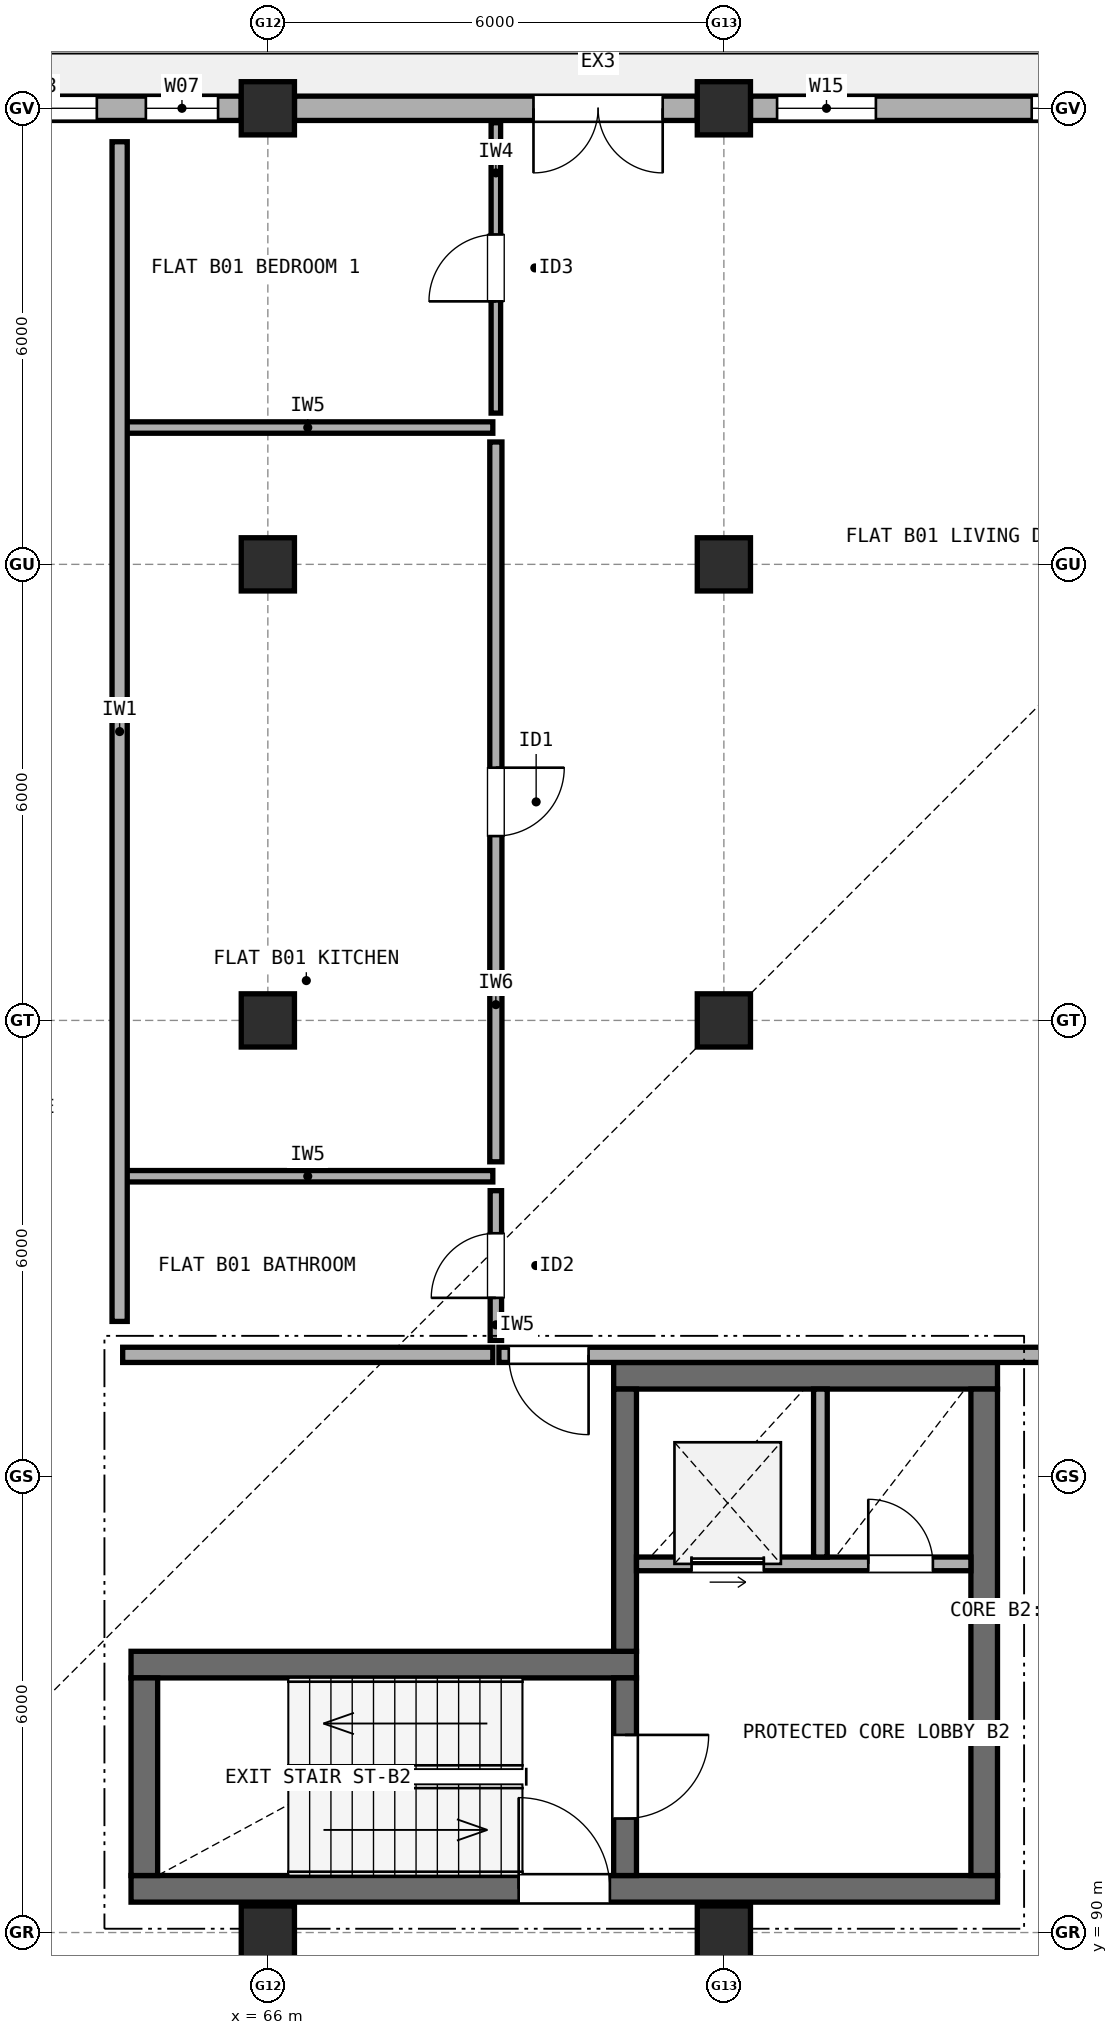
"""IFC4 building model, lengths in metres.
Left out: names, types, materials, properties, quantities, classifications, styles, units other than length and angle.
Written with IfcOpenShell. Run it as: python <this file> out.ifc"""

import sys

from ifc_helpers import new_model, si_unit, direction, frame, frame_2d, origin, origin_2d, place, context, subcontext, project, spatial, rectangle, extrude, element, fill, save


model = new_model("IFC4")
c1 = context("Model", 3, precision=1e-05, world=origin(), true_north=direction((0.0, 1.0)))
c2 = subcontext(c1, "Body", "Model", "MODEL_VIEW")
j1 = project(units=[si_unit("LENGTHUNIT", "METRE"), si_unit("PLANEANGLEUNIT", "RADIAN")], contexts=[c1])
p1 = place(None, origin())
s1 = spatial("IfcSite", under=j1, at=p1, CompositionType="ELEMENT")
p2 = place(p1, origin())
s2 = spatial("IfcBuilding", under=s1, at=p2, CompositionType="ELEMENT")
p3 = place(p2, origin())
s3 = spatial("IfcBuildingStorey", under=s2, at=p3, CompositionType="ELEMENT", Elevation=0.0)
for number, where, z_axis, x_axis in (
    (1, (66.0, 90.0, 0.0), (0.0, 0.0, 1.0), (1.0, 0.0, 0.0)),
    (2, (66.0, 102.0, 0.0), (0.0, 0.0, 1.0), (1.0, 0.0, 0.0)),
    (3, (66.0, 108.0, 0.0), (0.0, 0.0, 1.0), (1.0, 0.0, 0.0)),
    (4, (66.0, 114.0, 0.0), (0.0, 0.0, 1.0), (1.0, 0.0, 0.0)),
    (5, (72.0, 90.0, 0.0), (0.0, 0.0, 1.0), (1.0, 0.0, 0.0)),
    (6, (72.0, 102.0, 0.0), (0.0, 0.0, 1.0), (1.0, 0.0, 0.0)),
    (7, (72.0, 108.0, 0.0), (0.0, 0.0, 1.0), (1.0, 0.0, 0.0)),
    (8, (72.0, 114.0, 0.0), (0.0, 0.0, 1.0), (1.0, 0.0, 0.0)),
):
    element("IfcColumn", number, at=place(p3, frame(where, z_axis=z_axis, x_axis=x_axis)), inside=s3, PredefinedType="COLUMN", context=c2, shape_type="SweptSolid", body=[
        extrude(rectangle(XDim=0.7, YDim=0.7, at=origin_2d()), origin(), (0.0, 0.0, 1.0), 4.23),
    ])
p4 = place(p3, frame((77.7, 114.0, 0.0), z_axis=(0.0, 0.0, 1.0), x_axis=(-1.0, 0.0, 0.0)))
e9 = element("IfcWall", 9, at=p4, inside=s3, PredefinedType="STANDARD", context=c2, shape_type="SweptSolid", body=[
    extrude(rectangle(XDim=5.35, YDim=0.32, at=frame_2d((2.675, 0.0))), origin(), (0.0, 0.0, 1.0), 3.562),
])
p5 = place(p4, frame((0.35, 0.0, 0.9)))
e10 = element("IfcOpeningElement", 10, at=p5, cuts=e9, PredefinedType="OPENING", context=c2, shape_type="SweptSolid", body=[
    extrude(rectangle(XDim=1.3, YDim=1.45, at=frame_2d((0.65, 0.725))), frame((0.0, 0.17, 0.0), z_axis=(0.0, -1.0, 0.0), x_axis=(1.0, 0.0, 0.0)), (0.0, 0.0, 1.0), 0.34),
])
p6 = place(p4, frame((3.7, 0.0, 0.9)))
e11 = element("IfcOpeningElement", 11, at=p6, cuts=e9, PredefinedType="OPENING", context=c2, shape_type="SweptSolid", body=[
    extrude(rectangle(XDim=1.3, YDim=1.45, at=frame_2d((0.65, 0.725))), frame((0.0, 0.17, 0.0), z_axis=(0.0, -1.0, 0.0), x_axis=(1.0, 0.0, 0.0)), (0.0, 0.0, 1.0), 0.34),
])
p7 = place(p3, frame((71.65, 114.0, 0.0), z_axis=(0.0, 0.0, 1.0), x_axis=(-1.0, 0.0, 0.0)))
e12 = element("IfcWall", 12, at=p7, inside=s3, PredefinedType="STANDARD", context=c2, shape_type="SweptSolid", body=[
    extrude(rectangle(XDim=5.3, YDim=0.32, at=frame_2d((2.65, 0.0))), origin(), (0.0, 0.0, 1.0), 3.562),
])
p8 = place(p7, frame((0.455, 0.0, 0.0)))
e13 = element("IfcOpeningElement", 13, at=p8, cuts=e12, PredefinedType="OPENING", context=c2, shape_type="SweptSolid", body=[
    extrude(rectangle(XDim=1.7, YDim=2.2, at=frame_2d((0.85, 1.1))), frame((0.0, 0.17, 0.0), z_axis=(0.0, -1.0, 0.0), x_axis=(1.0, 0.0, 0.0)), (0.0, 0.0, 1.0), 0.34),
])
p9 = place(p3, frame((65.65, 114.0, 0.0), z_axis=(0.0, 0.0, 1.0), x_axis=(-1.0, 0.0, 0.0)))
e14 = element("IfcWall", 14, at=p9, inside=s3, PredefinedType="STANDARD", context=c2, shape_type="SweptSolid", body=[
    extrude(rectangle(XDim=5.3, YDim=0.32, at=frame_2d((2.65, 0.0))), origin(), (0.0, 0.0, 1.0), 3.562),
])
p10 = place(p9, frame((0.305, 0.0, 0.9)))
e15 = element("IfcOpeningElement", 15, at=p10, cuts=e14, PredefinedType="OPENING", context=c2, shape_type="SweptSolid", body=[
    extrude(rectangle(XDim=0.95, YDim=1.35, at=frame_2d((0.475, 0.675))), frame((0.0, 0.17, 0.0), z_axis=(0.0, -1.0, 0.0), x_axis=(1.0, 0.0, 0.0)), (0.0, 0.0, 1.0), 0.34),
])
p11 = place(p9, frame((1.9, 0.0, 0.9)))
e16 = element("IfcOpeningElement", 16, at=p11, cuts=e14, PredefinedType="OPENING", context=c2, shape_type="SweptSolid", body=[
    extrude(rectangle(XDim=1.5, YDim=1.4, at=frame_2d((0.75, 0.7))), frame((0.0, 0.17, 0.0), z_axis=(0.0, -1.0, 0.0), x_axis=(1.0, 0.0, 0.0)), (0.0, 0.0, 1.0), 0.34),
])
p12 = place(p9, frame((3.995, 0.0, 0.9)))
e17 = element("IfcOpeningElement", 17, at=p12, cuts=e14, PredefinedType="OPENING", context=c2, shape_type="SweptSolid", body=[
    extrude(rectangle(XDim=1.05, YDim=1.35, at=frame_2d((0.525, 0.675))), frame((0.0, 0.17, 0.0), z_axis=(0.0, -1.0, 0.0), x_axis=(1.0, 0.0, 0.0)), (0.0, 0.0, 1.0), 0.34),
])
p13 = place(p3, frame((64.2, 90.575, 0.0), z_axis=(0.0, 0.0, 1.0), x_axis=(1.0, 0.0, 0.0)))
e18 = element("IfcWall", 18, at=p13, inside=s3, PredefinedType="SHEAR", context=c2, shape_type="SweptSolid", body=[
    extrude(rectangle(XDim=11.4, YDim=0.35, at=frame_2d((5.7, 0.0))), origin(), (0.0, 0.0, 1.0), 4.23),
])
p14 = place(p13, frame((5.1, 0.0, 0.0)))
e19 = element("IfcOpeningElement", 19, at=p14, cuts=e18, PredefinedType="OPENING", context=c2, shape_type="SweptSolid", body=[
    extrude(rectangle(XDim=1.2, YDim=2.15, at=frame_2d((0.6, 1.075))), frame((0.0, 0.185, 0.0), z_axis=(0.0, -1.0, 0.0), x_axis=(1.0, 0.0, 0.0)), (0.0, 0.0, 1.0), 0.37),
])
p15 = place(p3, frame((70.85, 93.525, 0.0), z_axis=(0.0, 0.0, 1.0), x_axis=(-1.0, 0.0, 0.0)))
e20 = element("IfcWall", 20, at=p15, inside=s3, PredefinedType="SHEAR", context=c2, shape_type="SweptSolid", body=[
    extrude(rectangle(XDim=6.65, YDim=0.35, at=frame_2d((3.325, 0.0))), origin(), (0.0, 0.0, 1.0), 4.23),
])
p16 = place(p3, frame((64.375, 93.35, 0.0), z_axis=(0.0, 0.0, 1.0), x_axis=(0.0, -1.0, 0.0)))
e21 = element("IfcWall", 21, at=p16, inside=s3, PredefinedType="SHEAR", context=c2, shape_type="SweptSolid", body=[
    extrude(rectangle(XDim=2.6, YDim=0.35, at=frame_2d((1.3, 0.0))), origin(), (0.0, 0.0, 1.0), 4.23),
])
p17 = place(p3, frame((70.7, 90.75, 0.0), z_axis=(0.0, 0.0, 1.0), x_axis=(0.0, 1.0, 0.0)))
e22 = element("IfcWall", 22, at=p17, inside=s3, PredefinedType="SHEAR", context=c2, shape_type="SweptSolid", body=[
    extrude(rectangle(XDim=2.6, YDim=0.3, at=frame_2d((1.3, 0.0))), origin(), (0.0, 0.0, 1.0), 4.23),
])
p18 = place(p17, frame((0.75, 0.0, 0.0)))
e23 = element("IfcOpeningElement", 23, at=p18, cuts=e22, PredefinedType="OPENING", context=c2, shape_type="SweptSolid", body=[
    extrude(rectangle(XDim=1.1, YDim=2.15, at=frame_2d((0.55, 1.075))), frame((0.0, 0.16, 0.0), z_axis=(0.0, -1.0, 0.0), x_axis=(1.0, 0.0, 0.0)), (0.0, 0.0, 1.0), 0.32),
])
p19 = place(p3, frame((75.6, 97.325, 0.0), z_axis=(0.0, 0.0, 1.0), x_axis=(-1.0, 0.0, 0.0)))
e24 = element("IfcWall", 24, at=p19, inside=s3, PredefinedType="SHEAR", context=c2, shape_type="SweptSolid", body=[
    extrude(rectangle(XDim=5.05, YDim=0.35, at=frame_2d((2.525, 0.0))), origin(), (0.0, 0.0, 1.0), 4.23),
])
p20 = place(p3, frame((75.425, 90.75, 0.0), z_axis=(0.0, 0.0, 1.0), x_axis=(0.0, 1.0, 0.0)))
e25 = element("IfcWall", 25, at=p20, inside=s3, PredefinedType="SHEAR", context=c2, shape_type="SweptSolid", body=[
    extrude(rectangle(XDim=6.4, YDim=0.35, at=frame_2d((3.2, 0.0))), origin(), (0.0, 0.0, 1.0), 4.23),
])
p21 = place(p3, frame((70.7, 93.7, 0.0), z_axis=(0.0, 0.0, 1.0), x_axis=(0.0, 1.0, 0.0)))
e26 = element("IfcWall", 26, at=p21, inside=s3, PredefinedType="SHEAR", context=c2, shape_type="SweptSolid", body=[
    extrude(rectangle(XDim=3.45, YDim=0.3, at=frame_2d((1.725, 0.0))), origin(), (0.0, 0.0, 1.0), 4.23),
])
p22 = place(p3, frame((70.85, 94.85, 0.0), z_axis=(0.0, 0.0, 1.0), x_axis=(1.0, 0.0, 0.0)))
e27 = element("IfcWall", 27, at=p22, inside=s3, PredefinedType="SOLIDWALL", context=c2, shape_type="SweptSolid", body=[
    extrude(rectangle(XDim=4.4, YDim=0.18, at=frame_2d((2.2, 0.0))), origin(), (0.0, 0.0, 1.0), 4.23),
])
p23 = place(p22, frame((0.725, 0.0, 0.0)))
e28 = element("IfcOpeningElement", 28, at=p23, cuts=e27, PredefinedType="OPENING", context=c2, shape_type="SweptSolid", body=[
    extrude(rectangle(XDim=0.95, YDim=2.15, at=frame_2d((0.475, 1.075))), frame((0.0, 0.1, 0.0), z_axis=(0.0, -1.0, 0.0), x_axis=(1.0, 0.0, 0.0)), (0.0, 0.0, 1.0), 0.2),
])
p24 = place(p22, frame((3.05, 0.0, 0.0)))
e29 = element("IfcOpeningElement", 29, at=p24, cuts=e27, PredefinedType="OPENING", context=c2, shape_type="SweptSolid", body=[
    extrude(rectangle(XDim=0.85, YDim=2.1, at=frame_2d((0.425, 1.05))), frame((0.0, 0.1, 0.0), z_axis=(0.0, -1.0, 0.0), x_axis=(1.0, 0.0, 0.0)), (0.0, 0.0, 1.0), 0.2),
])
p25 = place(p3, frame((73.27, 94.94, 0.0), z_axis=(0.0, 0.0, 1.0), x_axis=(0.0, 1.0, 0.0)))
e30 = element("IfcWall", 30, at=p25, inside=s3, PredefinedType="SOLIDWALL", context=c2, shape_type="SweptSolid", body=[
    extrude(rectangle(XDim=2.21, YDim=0.18, at=frame_2d((1.105, 0.0))), origin(), (0.0, 0.0, 1.0), 4.23),
])
p26 = place(p3, frame((64.09, 97.6, 0.0), z_axis=(0.0, 0.0, 1.0), x_axis=(1.0, 0.0, 0.0)))
e31 = element("IfcWall", 31, at=p26, inside=s3, PredefinedType="SOLIDWALL", context=c2, shape_type="SweptSolid", body=[
    extrude(rectangle(XDim=4.87, YDim=0.2, at=frame_2d((2.435, 0.0))), origin(), (0.0, 0.0, 1.0), 4.23),
])
p27 = place(p3, frame((69.04, 97.6, 0.0), z_axis=(0.0, 0.0, 1.0), x_axis=(1.0, 0.0, 0.0)))
e32 = element("IfcWall", 32, at=p27, inside=s3, PredefinedType="SOLIDWALL", context=c2, shape_type="SweptSolid", body=[
    extrude(rectangle(XDim=11.92, YDim=0.2, at=frame_2d((5.96, 0.0))), origin(), (0.0, 0.0, 1.0), 3.712),
])
p28 = place(p27, frame((0.13, 0.0, 0.0)))
e33 = element("IfcOpeningElement", 33, at=p28, cuts=e32, PredefinedType="OPENING", context=c2, shape_type="SweptSolid", body=[
    extrude(rectangle(XDim=1.05, YDim=2.15, at=frame_2d((0.525, 1.075))), frame((0.0, 0.11, 0.0), z_axis=(0.0, -1.0, 0.0), x_axis=(1.0, 0.0, 0.0)), (0.0, 0.0, 1.0), 0.22),
])
p29 = place(p3, frame((69.0, 109.99, 0.0), z_axis=(0.0, 0.0, 1.0), x_axis=(0.0, 1.0, 0.0)))
e34 = element("IfcWall", 34, at=p29, inside=s3, PredefinedType="PARTITIONING", context=c2, shape_type="SweptSolid", body=[
    extrude(rectangle(XDim=3.82, YDim=0.125, at=frame_2d((1.91, 0.0))), origin(), (0.0, 0.0, 1.0), 4.23),
])
p30 = place(p29, frame((1.47, 0.0, 0.0)))
e35 = element("IfcOpeningElement", 35, at=p30, cuts=e34, PredefinedType="OPENING", context=c2, shape_type="SweptSolid", body=[
    extrude(rectangle(XDim=0.88, YDim=2.1, at=frame_2d((0.44, 1.05))), frame((0.0, 0.073, 0.0), z_axis=(0.0, -1.0, 0.0), x_axis=(1.0, 0.0, 0.0)), (0.0, 0.0, 1.0), 0.145),
])
p31 = place(p3, frame((69.0, 100.14, 0.0), z_axis=(0.0, 0.0, 1.0), x_axis=(0.0, 1.0, 0.0)))
e36 = element("IfcWall", 36, at=p31, inside=s3, PredefinedType="PLUMBINGWALL", context=c2, shape_type="SweptSolid", body=[
    extrude(rectangle(XDim=9.47, YDim=0.16, at=frame_2d((4.735, 0.0))), origin(), (0.0, 0.0, 1.0), 3.112),
])
p32 = place(p31, frame((4.285, 0.0, 0.0)))
e37 = element("IfcOpeningElement", 37, at=p32, cuts=e36, PredefinedType="OPENING", context=c2, shape_type="SweptSolid", body=[
    extrude(rectangle(XDim=0.9, YDim=2.1, at=frame_2d((0.45, 1.05))), frame((0.0, 0.09, 0.0), z_axis=(0.0, -1.0, 0.0), x_axis=(1.0, 0.0, 0.0)), (0.0, 0.0, 1.0), 0.18),
])
p33 = place(p3, frame((69.0, 97.79, 0.0), z_axis=(0.0, 0.0, 1.0), x_axis=(0.0, 1.0, 0.0)))
e38 = element("IfcWall", 38, at=p33, inside=s3, PredefinedType="PARTITIONING", context=c2, shape_type="SweptSolid", body=[
    extrude(rectangle(XDim=1.97, YDim=0.15, at=frame_2d((0.985, 0.0))), origin(), (0.0, 0.0, 1.0), 4.23),
])
p34 = place(p33, frame((0.56, 0.0, 0.0)))
e39 = element("IfcOpeningElement", 39, at=p34, cuts=e38, PredefinedType="OPENING", context=c2, shape_type="SweptSolid", body=[
    extrude(rectangle(XDim=0.85, YDim=2.1, at=frame_2d((0.425, 1.05))), frame((0.0, 0.085, 0.0), z_axis=(0.0, -1.0, 0.0), x_axis=(1.0, 0.0, 0.0)), (0.0, 0.0, 1.0), 0.17),
])
p35 = place(p3, frame((64.09, 109.8, 0.0), z_axis=(0.0, 0.0, 1.0), x_axis=(1.0, 0.0, 0.0)))
e40 = element("IfcWall", 40, at=p35, inside=s3, PredefinedType="PARTITIONING", context=c2, shape_type="SweptSolid", body=[
    extrude(rectangle(XDim=4.87, YDim=0.15, at=frame_2d((2.435, 0.0))), origin(), (0.0, 0.0, 1.0), 3.612),
])
p36 = place(p3, frame((64.09, 99.95, 0.0), z_axis=(0.0, 0.0, 1.0), x_axis=(1.0, 0.0, 0.0)))
e41 = element("IfcWall", 41, at=p36, inside=s3, PredefinedType="PARTITIONING", context=c2, shape_type="SweptSolid", body=[
    extrude(rectangle(XDim=4.87, YDim=0.15, at=frame_2d((2.435, 0.0))), origin(), (0.0, 0.0, 1.0), 4.23),
])
p37 = place(p3, frame((64.05, 98.04, 0.0), z_axis=(0.0, 0.0, 1.0), x_axis=(0.0, 1.0, 0.0)))
e42 = element("IfcWall", 42, at=p37, inside=s3, PredefinedType="SOLIDWALL", context=c2, shape_type="SweptSolid", body=[
    extrude(rectangle(XDim=15.52, YDim=0.2, at=frame_2d((7.76, 0.0))), origin(), (0.0, 0.0, 1.0), 3.112),
])
p38 = place(p5, origin())
e43 = element("IfcWindow", 43, at=p38, inside=s3, PartitioningType="SINGLE_PANEL", PredefinedType="WINDOW", context=c2, shape_type="SweptSolid", body=[
    extrude(rectangle(XDim=1.3, YDim=1.45, at=frame_2d((0.65, 0.725))), frame((0.0, 0.03, 0.0), z_axis=(0.0, -1.0, 0.0), x_axis=(1.0, 0.0, 0.0)), (0.0, 0.0, 1.0), 0.06),
])
fill(e10, e43)
p39 = place(p6, origin())
e44 = element("IfcWindow", 44, at=p39, inside=s3, PartitioningType="SINGLE_PANEL", PredefinedType="WINDOW", context=c2, shape_type="SweptSolid", body=[
    extrude(rectangle(XDim=1.3, YDim=1.45, at=frame_2d((0.65, 0.725))), frame((0.0, 0.03, 0.0), z_axis=(0.0, -1.0, 0.0), x_axis=(1.0, 0.0, 0.0)), (0.0, 0.0, 1.0), 0.06),
])
fill(e11, e44)
p40 = place(p8, frame((1.7, 0.0, 0.0), z_axis=(0.0, 0.0, 1.0), x_axis=(-1.0, 0.0, 0.0)))
e45 = element("IfcDoor", 45, at=p40, inside=s3, OperationType="DOUBLE_DOOR_SINGLE_SWING", PredefinedType="DOOR", context=c2, shape_type="SweptSolid", body=[
    extrude(rectangle(XDim=1.7, YDim=2.2, at=frame_2d((0.85, 1.1))), frame((0.0, 0.025, 0.0), z_axis=(0.0, -1.0, 0.0), x_axis=(1.0, 0.0, 0.0)), (0.0, 0.0, 1.0), 0.05),
])
fill(e13, e45)
p41 = place(p10, origin())
e46 = element("IfcWindow", 46, at=p41, inside=s3, PartitioningType="SINGLE_PANEL", PredefinedType="WINDOW", context=c2, shape_type="SweptSolid", body=[
    extrude(rectangle(XDim=0.95, YDim=1.35, at=frame_2d((0.475, 0.675))), frame((0.0, 0.03, 0.0), z_axis=(0.0, -1.0, 0.0), x_axis=(1.0, 0.0, 0.0)), (0.0, 0.0, 1.0), 0.06),
])
fill(e15, e46)
p42 = place(p11, origin())
e47 = element("IfcWindow", 47, at=p42, inside=s3, PartitioningType="SINGLE_PANEL", PredefinedType="WINDOW", context=c2, shape_type="SweptSolid", body=[
    extrude(rectangle(XDim=1.5, YDim=1.4, at=frame_2d((0.75, 0.7))), frame((0.0, 0.03, 0.0), z_axis=(0.0, -1.0, 0.0), x_axis=(1.0, 0.0, 0.0)), (0.0, 0.0, 1.0), 0.06),
])
fill(e16, e47)
p43 = place(p14, origin())
e48 = element("IfcDoor", 48, at=p43, inside=s3, OperationType="SINGLE_SWING_LEFT", PredefinedType="DOOR", context=c2, shape_type="SweptSolid", body=[
    extrude(rectangle(XDim=1.2, YDim=2.15, at=frame_2d((0.6, 1.075))), frame((0.0, 0.025, 0.0), z_axis=(0.0, -1.0, 0.0), x_axis=(1.0, 0.0, 0.0)), (0.0, 0.0, 1.0), 0.05),
])
fill(e19, e48)
p44 = place(p18, origin())
e49 = element("IfcDoor", 49, at=p44, inside=s3, OperationType="SINGLE_SWING_RIGHT", PredefinedType="DOOR", context=c2, shape_type="SweptSolid", body=[
    extrude(rectangle(XDim=1.1, YDim=2.15, at=frame_2d((0.55, 1.075))), frame((0.0, 0.025, 0.0), z_axis=(0.0, -1.0, 0.0), x_axis=(1.0, 0.0, 0.0)), (0.0, 0.0, 1.0), 0.05),
])
fill(e23, e49)
p45 = place(p23, origin())
e50 = element("IfcDoor", 50, at=p45, inside=s3, OperationType="SLIDING_TO_LEFT", PredefinedType="DOOR", context=c2, shape_type="SweptSolid", body=[
    extrude(rectangle(XDim=0.95, YDim=2.15, at=frame_2d((0.475, 1.075))), frame((0.0, 0.025, 0.0), z_axis=(0.0, -1.0, 0.0), x_axis=(1.0, 0.0, 0.0)), (0.0, 0.0, 1.0), 0.05),
])
fill(e28, e50)
p46 = place(p24, frame((0.85, 0.0, 0.0), z_axis=(0.0, 0.0, 1.0), x_axis=(-1.0, 0.0, 0.0)))
e51 = element("IfcDoor", 51, at=p46, inside=s3, OperationType="SINGLE_SWING_LEFT", PredefinedType="DOOR", context=c2, shape_type="SweptSolid", body=[
    extrude(rectangle(XDim=0.85, YDim=2.1, at=frame_2d((0.425, 1.05))), frame((0.0, 0.025, 0.0), z_axis=(0.0, -1.0, 0.0), x_axis=(1.0, 0.0, 0.0)), (0.0, 0.0, 1.0), 0.05),
])
fill(e29, e51)
p47 = place(p28, origin())
e52 = element("IfcDoor", 52, at=p47, inside=s3, OperationType="SINGLE_SWING_RIGHT", PredefinedType="DOOR", context=c2, shape_type="SweptSolid", body=[
    extrude(rectangle(XDim=1.05, YDim=2.15, at=frame_2d((0.525, 1.075))), frame((0.0, 0.025, 0.0), z_axis=(0.0, -1.0, 0.0), x_axis=(1.0, 0.0, 0.0)), (0.0, 0.0, 1.0), 0.05),
])
fill(e33, e52)
p48 = place(p30, origin())
e53 = element("IfcDoor", 53, at=p48, inside=s3, OperationType="SINGLE_SWING_LEFT", PredefinedType="DOOR", context=c2, shape_type="SweptSolid", body=[
    extrude(rectangle(XDim=0.88, YDim=2.1, at=frame_2d((0.44, 1.05))), frame((0.0, 0.025, 0.0), z_axis=(0.0, -1.0, 0.0), x_axis=(1.0, 0.0, 0.0)), (0.0, 0.0, 1.0), 0.05),
])
fill(e35, e53)
p49 = place(p32, origin())
e54 = element("IfcDoor", 54, at=p49, inside=s3, OperationType="SINGLE_SWING_RIGHT", PredefinedType="DOOR", context=c2, shape_type="SweptSolid", body=[
    extrude(rectangle(XDim=0.9, YDim=2.1, at=frame_2d((0.45, 1.05))), frame((0.0, 0.025, 0.0), z_axis=(0.0, -1.0, 0.0), x_axis=(1.0, 0.0, 0.0)), (0.0, 0.0, 1.0), 0.05),
])
fill(e37, e54)
p50 = place(p34, origin())
e55 = element("IfcDoor", 55, at=p50, inside=s3, OperationType="SINGLE_SWING_LEFT", PredefinedType="DOOR", context=c2, shape_type="SweptSolid", body=[
    extrude(rectangle(XDim=0.85, YDim=2.1, at=frame_2d((0.425, 1.05))), frame((0.0, 0.025, 0.0), z_axis=(0.0, -1.0, 0.0), x_axis=(1.0, 0.0, 0.0)), (0.0, 0.0, 1.0), 0.05),
])
fill(e39, e55)
save(model, sys.argv[1])
